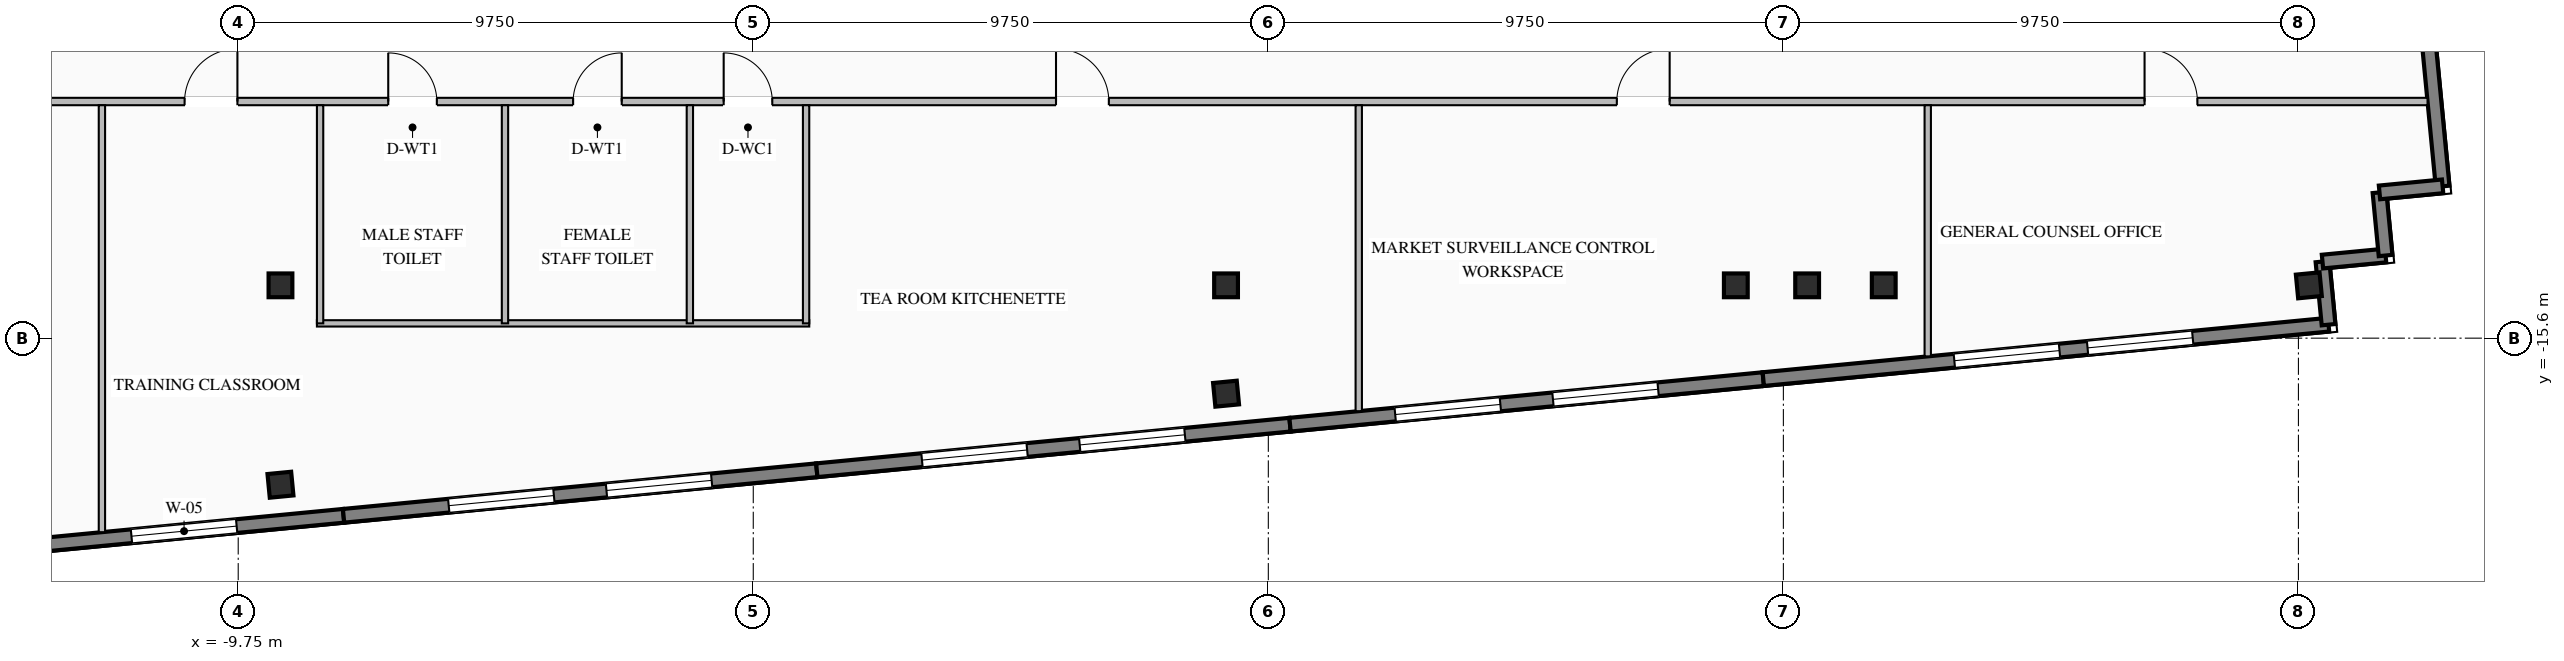
"""IFC4 building model, lengths in metres.
Left out: names, types, materials, properties, quantities, classifications, styles, units other than length and angle.
Written with IfcOpenShell. Run it as: python <this file> out.ifc"""

import sys

from ifc_helpers import new_model, si_unit, direction, frame, frame_2d, origin, origin_2d, place, context, subcontext, project, spatial, rectangle, i_section, extrude, element, fill, save


model = new_model("IFC4")
c1 = context("Model", 3, precision=1e-05, world=origin(), true_north=direction((0.0, 1.0)))
c2 = subcontext(c1, "Body", "Model", "MODEL_VIEW")
j1 = project(units=[si_unit("LENGTHUNIT", "METRE"), si_unit("PLANEANGLEUNIT", "RADIAN")], contexts=[c1])
p1 = place(None, origin())
s1 = spatial("IfcSite", under=j1, at=p1, CompositionType="ELEMENT")
p2 = place(p1, origin())
s2 = spatial("IfcBuilding", under=s1, at=p2, CompositionType="ELEMENT")
p3 = place(p2, frame((0.0, 0.0, 272.4)))
s3 = spatial("IfcBuildingStorey", under=s2, at=p3, CompositionType="ELEMENT", Elevation=272.4)
for number, where, z_axis, x_axis in (
    (1, (-8.95, -14.6, 0.0), (0.0, 0.0, 1.0), (1.0, 0.0, 0.0)),
    (2, (8.95, -14.6, 0.0), (0.0, 0.0, 1.0), (1.0, 0.0, 0.0)),
    (3, (18.6, -14.6, 0.0), (0.0, 0.0, 1.0), (1.0, 0.0, 0.0)),
    (4, (19.95, -14.6, 0.0), (0.0, 0.0, 1.0), (1.0, 0.0, 0.0)),
    (5, (21.4, -14.6, 0.0), (0.0, 0.0, 1.0), (1.0, 0.0, 0.0)),
    (6, (-8.95, -18.375, 0.0), (0.0, 0.0, 1.0), (0.995, 0.096, 0.0)),
    (7, (8.95, -16.651, 0.0), (0.0, 0.0, 1.0), (0.995, 0.096, 0.0)),
    (8, (29.447, -14.6, 0.0), (0.0, 0.0, 1.0), (0.995, 0.096, 0.0)),
):
    element("IfcColumn", number, at=place(p3, frame(where, z_axis=z_axis, x_axis=x_axis)), inside=s3, PredefinedType="COLUMN", context=c2, shape_type="SweptSolid", body=[
        extrude(i_section(OverallWidth=0.45, OverallDepth=0.45, WebThickness=0.022, FlangeThickness=0.032, at=origin_2d()), origin(), (0.0, 0.0, 1.0), 3.45),
    ])
p4 = place(p3, frame((-7.756, -18.963, 0.0), z_axis=(0.0, 0.0, 1.0), x_axis=(-0.995396745868, -0.095840066339, 0.0)))
e9 = element("IfcWall", 9, at=p4, inside=s3, PredefinedType="STANDARD", context=c2, shape_type="SweptSolid", body=[
    extrude(rectangle(XDim=10.75, YDim=0.26, at=frame_2d((5.375, 0.0))), origin(), (0.0, 0.0, 1.0), 3.25),
])
p5 = place(p4, frame((2.033, 0.0, 0.76)))
e10 = element("IfcOpeningElement", 10, at=p5, cuts=e9, PredefinedType="OPENING", context=c2, shape_type="SweptSolid", body=[
    extrude(rectangle(XDim=2.0, YDim=2.05, at=frame_2d((1.0, 1.025))), frame((0.0, 0.14, 0.0), z_axis=(0.0, -1.0, 0.0), x_axis=(1.0, 0.0, 0.0)), (0.0, 0.0, 1.0), 0.28),
])
p6 = place(p4, frame((6.167, 0.0, 0.76)))
e11 = element("IfcOpeningElement", 11, at=p6, cuts=e9, PredefinedType="OPENING", context=c2, shape_type="SweptSolid", body=[
    extrude(rectangle(XDim=2.0, YDim=2.05, at=frame_2d((1.0, 1.025))), frame((0.0, 0.14, 0.0), z_axis=(0.0, -1.0, 0.0), x_axis=(1.0, 0.0, 0.0)), (0.0, 0.0, 1.0), 0.28),
])
p7 = place(p3, frame((1.203, -18.101, 0.0), z_axis=(0.0, 0.0, 1.0), x_axis=(-0.995397043619, -0.095836973841, 0.0)))
e12 = element("IfcWall", 12, at=p7, inside=s3, PredefinedType="STANDARD", context=c2, shape_type="SweptSolid", body=[
    extrude(rectangle(XDim=9.0, YDim=0.26, at=frame_2d((4.5, 0.0))), origin(), (0.0, 0.0, 1.0), 3.25),
])
p8 = place(p7, frame((2.0, 0.0, 0.76)))
e13 = element("IfcOpeningElement", 13, at=p8, cuts=e12, PredefinedType="OPENING", context=c2, shape_type="SweptSolid", body=[
    extrude(rectangle(XDim=2.0, YDim=2.05, at=frame_2d((1.0, 1.025))), frame((0.0, 0.14, 0.0), z_axis=(0.0, -1.0, 0.0), x_axis=(1.0, 0.0, 0.0)), (0.0, 0.0, 1.0), 0.28),
])
p9 = place(p7, frame((5.0, 0.0, 0.76)))
e14 = element("IfcOpeningElement", 14, at=p9, cuts=e12, PredefinedType="OPENING", context=c2, shape_type="SweptSolid", body=[
    extrude(rectangle(XDim=2.0, YDim=2.05, at=frame_2d((1.0, 1.025))), frame((0.0, 0.14, 0.0), z_axis=(0.0, -1.0, 0.0), x_axis=(1.0, 0.0, 0.0)), (0.0, 0.0, 1.0), 0.28),
])
p10 = place(p3, frame((10.161, -17.238, 0.0), z_axis=(0.0, 0.0, 1.0), x_axis=(-0.995394206237, -0.095866439332, 0.0)))
e15 = element("IfcWall", 15, at=p10, inside=s3, PredefinedType="STANDARD", context=c2, shape_type="SweptSolid", body=[
    extrude(rectangle(XDim=9.0, YDim=0.26, at=frame_2d((4.5, 0.0))), origin(), (0.0, 0.0, 1.0), 3.25),
])
p11 = place(p10, frame((2.0, 0.0, 0.76)))
e16 = element("IfcOpeningElement", 16, at=p11, cuts=e15, PredefinedType="OPENING", context=c2, shape_type="SweptSolid", body=[
    extrude(rectangle(XDim=2.0, YDim=2.05, at=frame_2d((1.0, 1.025))), frame((0.0, 0.14, 0.0), z_axis=(0.0, -1.0, 0.0), x_axis=(1.0, 0.0, 0.0)), (0.0, 0.0, 1.0), 0.28),
])
p12 = place(p10, frame((5.0, 0.0, 0.76)))
e17 = element("IfcOpeningElement", 17, at=p12, cuts=e15, PredefinedType="OPENING", context=c2, shape_type="SweptSolid", body=[
    extrude(rectangle(XDim=2.0, YDim=2.05, at=frame_2d((1.0, 1.025))), frame((0.0, 0.14, 0.0), z_axis=(0.0, -1.0, 0.0), x_axis=(1.0, 0.0, 0.0)), (0.0, 0.0, 1.0), 0.28),
])
p13 = place(p3, frame((19.12, -16.375, 0.0), z_axis=(0.0, 0.0, 1.0), x_axis=(-0.995396794462, -0.09583956164, 0.0)))
e18 = element("IfcWall", 18, at=p13, inside=s3, PredefinedType="STANDARD", context=c2, shape_type="SweptSolid", body=[
    extrude(rectangle(XDim=9.0, YDim=0.26, at=frame_2d((4.5, 0.0))), origin(), (0.0, 0.0, 1.0), 3.25),
])
p14 = place(p13, frame((2.0, 0.0, 0.76)))
e19 = element("IfcOpeningElement", 19, at=p14, cuts=e18, PredefinedType="OPENING", context=c2, shape_type="SweptSolid", body=[
    extrude(rectangle(XDim=2.0, YDim=2.05, at=frame_2d((1.0, 1.025))), frame((0.0, 0.14, 0.0), z_axis=(0.0, -1.0, 0.0), x_axis=(1.0, 0.0, 0.0)), (0.0, 0.0, 1.0), 0.28),
])
p15 = place(p13, frame((5.0, 0.0, 0.76)))
e20 = element("IfcOpeningElement", 20, at=p15, cuts=e18, PredefinedType="OPENING", context=c2, shape_type="SweptSolid", body=[
    extrude(rectangle(XDim=2.0, YDim=2.05, at=frame_2d((1.0, 1.025))), frame((0.0, 0.14, 0.0), z_axis=(0.0, -1.0, 0.0), x_axis=(1.0, 0.0, 0.0)), (0.0, 0.0, 1.0), 0.28),
])
p16 = place(p3, frame((29.821, -15.345, 0.0), z_axis=(0.0, 0.0, 1.0), x_axis=(-0.995396954468, -0.095837899791, 0.0)))
e21 = element("IfcWall", 21, at=p16, inside=s3, PredefinedType="STANDARD", context=c2, shape_type="SweptSolid", body=[
    extrude(rectangle(XDim=10.75, YDim=0.26, at=frame_2d((5.375, 0.0))), origin(), (0.0, 0.0, 1.0), 3.25),
])
p17 = place(p16, frame((2.583, 0.0, 0.76)))
e22 = element("IfcOpeningElement", 22, at=p17, cuts=e21, PredefinedType="OPENING", context=c2, shape_type="SweptSolid", body=[
    extrude(rectangle(XDim=2.0, YDim=2.05, at=frame_2d((1.0, 1.025))), frame((0.0, 0.14, 0.0), z_axis=(0.0, -1.0, 0.0), x_axis=(1.0, 0.0, 0.0)), (0.0, 0.0, 1.0), 0.28),
])
p18 = place(p16, frame((5.117, 0.0, 0.76)))
e23 = element("IfcOpeningElement", 23, at=p18, cuts=e21, PredefinedType="OPENING", context=c2, shape_type="SweptSolid", body=[
    extrude(rectangle(XDim=2.0, YDim=2.05, at=frame_2d((1.0, 1.025))), frame((0.0, 0.14, 0.0), z_axis=(0.0, -1.0, 0.0), x_axis=(1.0, 0.0, 0.0)), (0.0, 0.0, 1.0), 0.28),
])
p19 = place(p3, frame((30.527, 2.354, 0.0), z_axis=(0.0, 0.0, 1.0), x_axis=(0.095850890337, -0.995395703638, 0.0)))
e24 = element("IfcWall", 24, at=p19, inside=s3, PredefinedType="STANDARD", context=c2, shape_type="SweptSolid", body=[
    extrude(rectangle(XDim=15.15, YDim=0.26, at=frame_2d((7.575, 0.0))), origin(), (0.0, 0.0, 1.0), 3.25),
])
p20 = place(p19, frame((4.35, 0.0, 0.76)))
e25 = element("IfcOpeningElement", 25, at=p20, cuts=e24, PredefinedType="OPENING", context=c2, shape_type="SweptSolid", body=[
    extrude(rectangle(XDim=1.4, YDim=1.95, at=frame_2d((0.7, 0.975))), frame((0.0, 0.14, 0.0), z_axis=(0.0, -1.0, 0.0), x_axis=(1.0, 0.0, 0.0)), (0.0, 0.0, 1.0), 0.28),
])
p21 = place(p19, frame((9.4, 0.0, 0.76)))
e26 = element("IfcOpeningElement", 26, at=p21, cuts=e24, PredefinedType="OPENING", context=c2, shape_type="SweptSolid", body=[
    extrude(rectangle(XDim=1.4, YDim=1.95, at=frame_2d((0.7, 0.975))), frame((0.0, 0.14, 0.0), z_axis=(0.0, -1.0, 0.0), x_axis=(1.0, 0.0, 0.0)), (0.0, 0.0, 1.0), 0.28),
])
for number, where, z_axis, x_axis in (
    (27, (29.821, -15.345, 0.0), (0.0, 0.0, 1.0), (-0.096, 0.995, 0.0)),
    (28, (29.705, -14.15, 0.0), (0.0, 0.0, 1.0), (0.995, 0.096, 0.0)),
):
    element("IfcWall", number, at=place(p3, frame(where, z_axis=z_axis, x_axis=x_axis)), inside=s3, PredefinedType="STANDARD", context=c2, shape_type="SweptSolid", body=[
        extrude(rectangle(XDim=1.2, YDim=0.26, at=frame_2d((0.6, 0.0))), origin(), (0.0, 0.0, 1.0), 2.565),
    ])
p22 = place(p3, frame((30.9, -14.035, 0.0), z_axis=(0.0, 0.0, 1.0), x_axis=(-0.095836473879, 0.995397091755, 0.0)))
e29 = element("IfcWall", 29, at=p22, inside=s3, PredefinedType="STANDARD", context=c2, shape_type="SweptSolid", body=[
    extrude(rectangle(XDim=1.2, YDim=0.26, at=frame_2d((0.6, 0.0))), origin(), (0.0, 0.0, 1.0), 2.565),
])
p23 = place(p3, frame((30.785, -12.841, 0.0), z_axis=(0.0, 0.0, 1.0), x_axis=(0.995398960025, 0.095817067274, 0.0)))
e30 = element("IfcWall", 30, at=p23, inside=s3, PredefinedType="STANDARD", context=c2, shape_type="SweptSolid", body=[
    extrude(rectangle(XDim=1.2, YDim=0.26, at=frame_2d((0.6, 0.0))), origin(), (0.0, 0.0, 1.0), 2.565),
])
p24 = place(p3, frame((-21.591, -11.12, 0.0), z_axis=(0.0, 0.0, 1.0), x_axis=(1.0, 0.0, 0.0)))
e31 = element("IfcWall", 31, at=p24, inside=s3, PredefinedType="STANDARD", context=c2, shape_type="SweptSolid", body=[
    extrude(rectangle(XDim=53.285, YDim=0.14, at=frame_2d((26.643, 0.0))), origin(), (0.0, 0.0, 1.0), 3.25),
])
p25 = place(p24, frame((14.681, 0.0, 0.0)))
e32 = element("IfcOpeningElement", 32, at=p25, cuts=e31, PredefinedType="OPENING", context=c2, shape_type="SweptSolid", body=[
    extrude(rectangle(XDim=0.92, YDim=2.08, at=frame_2d((0.46, 1.04))), frame((0.0, 0.08, 0.0), z_axis=(0.0, -1.0, 0.0), x_axis=(1.0, 0.0, 0.0)), (0.0, 0.0, 1.0), 0.16),
])
p26 = place(p24, frame((18.181, 0.0, 0.0)))
e33 = element("IfcOpeningElement", 33, at=p26, cuts=e31, PredefinedType="OPENING", context=c2, shape_type="SweptSolid", body=[
    extrude(rectangle(XDim=0.92, YDim=2.08, at=frame_2d((0.46, 1.04))), frame((0.0, 0.08, 0.0), z_axis=(0.0, -1.0, 0.0), x_axis=(1.0, 0.0, 0.0)), (0.0, 0.0, 1.0), 0.16),
])
p27 = place(p24, frame((21.031, 0.0, 0.0)))
e34 = element("IfcOpeningElement", 34, at=p27, cuts=e31, PredefinedType="OPENING", context=c2, shape_type="SweptSolid", body=[
    extrude(rectangle(XDim=0.92, YDim=2.08, at=frame_2d((0.46, 1.04))), frame((0.0, 0.08, 0.0), z_axis=(0.0, -1.0, 0.0), x_axis=(1.0, 0.0, 0.0)), (0.0, 0.0, 1.0), 0.16),
])
p28 = place(p24, frame((1.925, 0.0, 0.0)))
e35 = element("IfcOpeningElement", 35, at=p28, cuts=e31, PredefinedType="OPENING", context=c2, shape_type="SweptSolid", body=[
    extrude(rectangle(XDim=1.0, YDim=2.08, at=frame_2d((0.5, 1.04))), frame((0.0, 0.08, 0.0), z_axis=(0.0, -1.0, 0.0), x_axis=(1.0, 0.0, 0.0)), (0.0, 0.0, 1.0), 0.16),
])
p29 = place(p24, frame((6.429, 0.0, 0.0)))
e36 = element("IfcOpeningElement", 36, at=p29, cuts=e31, PredefinedType="OPENING", context=c2, shape_type="SweptSolid", body=[
    extrude(rectangle(XDim=1.0, YDim=2.08, at=frame_2d((0.5, 1.04))), frame((0.0, 0.08, 0.0), z_axis=(0.0, -1.0, 0.0), x_axis=(1.0, 0.0, 0.0)), (0.0, 0.0, 1.0), 0.16),
])
p30 = place(p24, frame((10.826, 0.0, 0.0)))
e37 = element("IfcOpeningElement", 37, at=p30, cuts=e31, PredefinedType="OPENING", context=c2, shape_type="SweptSolid", body=[
    extrude(rectangle(XDim=1.0, YDim=2.08, at=frame_2d((0.5, 1.04))), frame((0.0, 0.08, 0.0), z_axis=(0.0, -1.0, 0.0), x_axis=(1.0, 0.0, 0.0)), (0.0, 0.0, 1.0), 0.16),
])
p31 = place(p24, frame((27.322, 0.0, 0.0)))
e38 = element("IfcOpeningElement", 38, at=p31, cuts=e31, PredefinedType="OPENING", context=c2, shape_type="SweptSolid", body=[
    extrude(rectangle(XDim=1.0, YDim=2.08, at=frame_2d((0.5, 1.04))), frame((0.0, 0.08, 0.0), z_axis=(0.0, -1.0, 0.0), x_axis=(1.0, 0.0, 0.0)), (0.0, 0.0, 1.0), 0.16),
])
p32 = place(p24, frame((37.939, 0.0, 0.0)))
e39 = element("IfcOpeningElement", 39, at=p32, cuts=e31, PredefinedType="OPENING", context=c2, shape_type="SweptSolid", body=[
    extrude(rectangle(XDim=1.0, YDim=2.08, at=frame_2d((0.5, 1.04))), frame((0.0, 0.08, 0.0), z_axis=(0.0, -1.0, 0.0), x_axis=(1.0, 0.0, 0.0)), (0.0, 0.0, 1.0), 0.16),
])
p33 = place(p24, frame((47.929, 0.0, 0.0)))
e40 = element("IfcOpeningElement", 40, at=p33, cuts=e31, PredefinedType="OPENING", context=c2, shape_type="SweptSolid", body=[
    extrude(rectangle(XDim=1.0, YDim=2.08, at=frame_2d((0.5, 1.04))), frame((0.0, 0.08, 0.0), z_axis=(0.0, -1.0, 0.0), x_axis=(1.0, 0.0, 0.0)), (0.0, 0.0, 1.0), 0.16),
])
p34 = place(p3, frame((-8.26, -15.32, 0.0), z_axis=(0.0, 0.0, 1.0), x_axis=(1.0, 0.0, 0.0)))
e41 = element("IfcWall", 41, at=p34, inside=s3, PredefinedType="STANDARD", context=c2, shape_type="SweptSolid", body=[
    extrude(rectangle(XDim=9.32, YDim=0.12, at=frame_2d((4.66, 0.0))), origin(), (0.0, 0.0, 1.0), 3.25),
])
for number, where, z_axis, x_axis in (
    (42, (-8.2, -15.32, 0.0), (0.0, 0.0, 1.0), (0.0, 1.0, 0.0)),
    (43, (-4.7, -15.32, 0.0), (0.0, 0.0, 1.0), (0.0, 1.0, 0.0)),
    (44, (-1.2, -15.32, 0.0), (0.0, 0.0, 1.0), (0.0, 1.0, 0.0)),
    (45, (1.0, -15.32, 0.0), (0.0, 0.0, 1.0), (0.0, 1.0, 0.0)),
):
    element("IfcWall", number, at=place(p3, frame(where, z_axis=z_axis, x_axis=x_axis)), inside=s3, PredefinedType="STANDARD", context=c2, shape_type="SweptSolid", body=[
        extrude(rectangle(XDim=4.13, YDim=0.12, at=frame_2d((2.065, 0.0))), origin(), (0.0, 0.0, 1.0), 3.25),
    ])
p35 = place(p3, frame((-12.33, -19.273, 0.0), z_axis=(0.0, 0.0, 1.0), x_axis=(0.0, 1.0, 0.0)))
e46 = element("IfcWall", 46, at=p35, inside=s3, PredefinedType="STANDARD", context=c2, shape_type="SweptSolid", body=[
    extrude(rectangle(XDim=8.083, YDim=0.12, at=frame_2d((4.042, 0.0))), origin(), (0.0, 0.0, 1.0), 3.25),
])
p36 = place(p3, frame((11.462, -16.982, 0.0), z_axis=(0.0, 0.0, 1.0), x_axis=(0.0, 1.0, 0.0)))
e47 = element("IfcWall", 47, at=p36, inside=s3, PredefinedType="STANDARD", context=c2, shape_type="SweptSolid", body=[
    extrude(rectangle(XDim=5.792, YDim=0.12, at=frame_2d((2.896, 0.0))), origin(), (0.0, 0.0, 1.0), 3.25),
])
p37 = place(p3, frame((22.233, -15.945, 0.0), z_axis=(0.0, 0.0, 1.0), x_axis=(0.0, 1.0, 0.0)))
e48 = element("IfcWall", 48, at=p37, inside=s3, PredefinedType="STANDARD", context=c2, shape_type="SweptSolid", body=[
    extrude(rectangle(XDim=4.755, YDim=0.12, at=frame_2d((2.377, 0.0))), origin(), (0.0, 0.0, 1.0), 3.25),
])
p38 = place(p5, origin())
e49 = element("IfcWindow", 49, at=p38, inside=s3, PartitioningType="DOUBLE_PANEL_VERTICAL", PredefinedType="WINDOW", context=c2, shape_type="SweptSolid", body=[
    extrude(rectangle(XDim=2.0, YDim=2.05, at=frame_2d((1.0, 1.025))), frame((0.0, 0.03, 0.0), z_axis=(0.0, -1.0, 0.0), x_axis=(1.0, 0.0, 0.0)), (0.0, 0.0, 1.0), 0.06),
])
fill(e10, e49)
p39 = place(p8, origin())
e50 = element("IfcWindow", 50, at=p39, inside=s3, PartitioningType="DOUBLE_PANEL_VERTICAL", PredefinedType="WINDOW", context=c2, shape_type="SweptSolid", body=[
    extrude(rectangle(XDim=2.0, YDim=2.05, at=frame_2d((1.0, 1.025))), frame((0.0, 0.03, 0.0), z_axis=(0.0, -1.0, 0.0), x_axis=(1.0, 0.0, 0.0)), (0.0, 0.0, 1.0), 0.06),
])
fill(e13, e50)
p40 = place(p9, origin())
e51 = element("IfcWindow", 51, at=p40, inside=s3, PartitioningType="DOUBLE_PANEL_VERTICAL", PredefinedType="WINDOW", context=c2, shape_type="SweptSolid", body=[
    extrude(rectangle(XDim=2.0, YDim=2.05, at=frame_2d((1.0, 1.025))), frame((0.0, 0.03, 0.0), z_axis=(0.0, -1.0, 0.0), x_axis=(1.0, 0.0, 0.0)), (0.0, 0.0, 1.0), 0.06),
])
fill(e14, e51)
p41 = place(p11, origin())
e52 = element("IfcWindow", 52, at=p41, inside=s3, PartitioningType="DOUBLE_PANEL_VERTICAL", PredefinedType="WINDOW", context=c2, shape_type="SweptSolid", body=[
    extrude(rectangle(XDim=2.0, YDim=2.05, at=frame_2d((1.0, 1.025))), frame((0.0, 0.03, 0.0), z_axis=(0.0, -1.0, 0.0), x_axis=(1.0, 0.0, 0.0)), (0.0, 0.0, 1.0), 0.06),
])
fill(e16, e52)
p42 = place(p12, origin())
e53 = element("IfcWindow", 53, at=p42, inside=s3, PartitioningType="DOUBLE_PANEL_VERTICAL", PredefinedType="WINDOW", context=c2, shape_type="SweptSolid", body=[
    extrude(rectangle(XDim=2.0, YDim=2.05, at=frame_2d((1.0, 1.025))), frame((0.0, 0.03, 0.0), z_axis=(0.0, -1.0, 0.0), x_axis=(1.0, 0.0, 0.0)), (0.0, 0.0, 1.0), 0.06),
])
fill(e17, e53)
p43 = place(p14, origin())
e54 = element("IfcWindow", 54, at=p43, inside=s3, PartitioningType="DOUBLE_PANEL_VERTICAL", PredefinedType="WINDOW", context=c2, shape_type="SweptSolid", body=[
    extrude(rectangle(XDim=2.0, YDim=2.05, at=frame_2d((1.0, 1.025))), frame((0.0, 0.03, 0.0), z_axis=(0.0, -1.0, 0.0), x_axis=(1.0, 0.0, 0.0)), (0.0, 0.0, 1.0), 0.06),
])
fill(e19, e54)
p44 = place(p15, origin())
e55 = element("IfcWindow", 55, at=p44, inside=s3, PartitioningType="DOUBLE_PANEL_VERTICAL", PredefinedType="WINDOW", context=c2, shape_type="SweptSolid", body=[
    extrude(rectangle(XDim=2.0, YDim=2.05, at=frame_2d((1.0, 1.025))), frame((0.0, 0.03, 0.0), z_axis=(0.0, -1.0, 0.0), x_axis=(1.0, 0.0, 0.0)), (0.0, 0.0, 1.0), 0.06),
])
fill(e20, e55)
p45 = place(p17, origin())
e56 = element("IfcWindow", 56, at=p45, inside=s3, PartitioningType="DOUBLE_PANEL_VERTICAL", PredefinedType="WINDOW", context=c2, shape_type="SweptSolid", body=[
    extrude(rectangle(XDim=2.0, YDim=2.05, at=frame_2d((1.0, 1.025))), frame((0.0, 0.03, 0.0), z_axis=(0.0, -1.0, 0.0), x_axis=(1.0, 0.0, 0.0)), (0.0, 0.0, 1.0), 0.06),
])
fill(e22, e56)
p46 = place(p18, origin())
e57 = element("IfcWindow", 57, at=p46, inside=s3, PartitioningType="DOUBLE_PANEL_VERTICAL", PredefinedType="WINDOW", context=c2, shape_type="SweptSolid", body=[
    extrude(rectangle(XDim=2.0, YDim=2.05, at=frame_2d((1.0, 1.025))), frame((0.0, 0.03, 0.0), z_axis=(0.0, -1.0, 0.0), x_axis=(1.0, 0.0, 0.0)), (0.0, 0.0, 1.0), 0.06),
])
fill(e23, e57)
p47 = place(p25, origin())
e58 = element("IfcDoor", 58, at=p47, inside=s3, OperationType="SINGLE_SWING_LEFT", PredefinedType="DOOR", context=c2, shape_type="SweptSolid", body=[
    extrude(rectangle(XDim=0.92, YDim=2.08, at=frame_2d((0.46, 1.04))), frame((0.0, 0.025, 0.0), z_axis=(0.0, -1.0, 0.0), x_axis=(1.0, 0.0, 0.0)), (0.0, 0.0, 1.0), 0.05),
])
fill(e32, e58)
p48 = place(p26, origin())
e59 = element("IfcDoor", 59, at=p48, inside=s3, OperationType="SINGLE_SWING_RIGHT", PredefinedType="DOOR", context=c2, shape_type="SweptSolid", body=[
    extrude(rectangle(XDim=0.92, YDim=2.08, at=frame_2d((0.46, 1.04))), frame((0.0, 0.025, 0.0), z_axis=(0.0, -1.0, 0.0), x_axis=(1.0, 0.0, 0.0)), (0.0, 0.0, 1.0), 0.05),
])
fill(e33, e59)
p49 = place(p27, origin())
e60 = element("IfcDoor", 60, at=p49, inside=s3, OperationType="SINGLE_SWING_LEFT", PredefinedType="DOOR", context=c2, shape_type="SweptSolid", body=[
    extrude(rectangle(XDim=0.92, YDim=2.08, at=frame_2d((0.46, 1.04))), frame((0.0, 0.025, 0.0), z_axis=(0.0, -1.0, 0.0), x_axis=(1.0, 0.0, 0.0)), (0.0, 0.0, 1.0), 0.05),
])
fill(e34, e60)
p50 = place(p30, origin())
e61 = element("IfcDoor", 61, at=p50, inside=s3, OperationType="SINGLE_SWING_RIGHT", PredefinedType="DOOR", context=c2, shape_type="SweptSolid", body=[
    extrude(rectangle(XDim=1.0, YDim=2.08, at=frame_2d((0.5, 1.04))), frame((0.0, 0.025, 0.0), z_axis=(0.0, -1.0, 0.0), x_axis=(1.0, 0.0, 0.0)), (0.0, 0.0, 1.0), 0.05),
])
fill(e37, e61)
p51 = place(p31, origin())
e62 = element("IfcDoor", 62, at=p51, inside=s3, OperationType="SINGLE_SWING_LEFT", PredefinedType="DOOR", context=c2, shape_type="SweptSolid", body=[
    extrude(rectangle(XDim=1.0, YDim=2.08, at=frame_2d((0.5, 1.04))), frame((0.0, 0.025, 0.0), z_axis=(0.0, -1.0, 0.0), x_axis=(1.0, 0.0, 0.0)), (0.0, 0.0, 1.0), 0.05),
])
fill(e38, e62)
p52 = place(p32, origin())
e63 = element("IfcDoor", 63, at=p52, inside=s3, OperationType="SINGLE_SWING_RIGHT", PredefinedType="DOOR", context=c2, shape_type="SweptSolid", body=[
    extrude(rectangle(XDim=1.0, YDim=2.08, at=frame_2d((0.5, 1.04))), frame((0.0, 0.025, 0.0), z_axis=(0.0, -1.0, 0.0), x_axis=(1.0, 0.0, 0.0)), (0.0, 0.0, 1.0), 0.05),
])
fill(e39, e63)
p53 = place(p33, origin())
e64 = element("IfcDoor", 64, at=p53, inside=s3, OperationType="SINGLE_SWING_LEFT", PredefinedType="DOOR", context=c2, shape_type="SweptSolid", body=[
    extrude(rectangle(XDim=1.0, YDim=2.08, at=frame_2d((0.5, 1.04))), frame((0.0, 0.025, 0.0), z_axis=(0.0, -1.0, 0.0), x_axis=(1.0, 0.0, 0.0)), (0.0, 0.0, 1.0), 0.05),
])
fill(e40, e64)
save(model, sys.argv[1])
